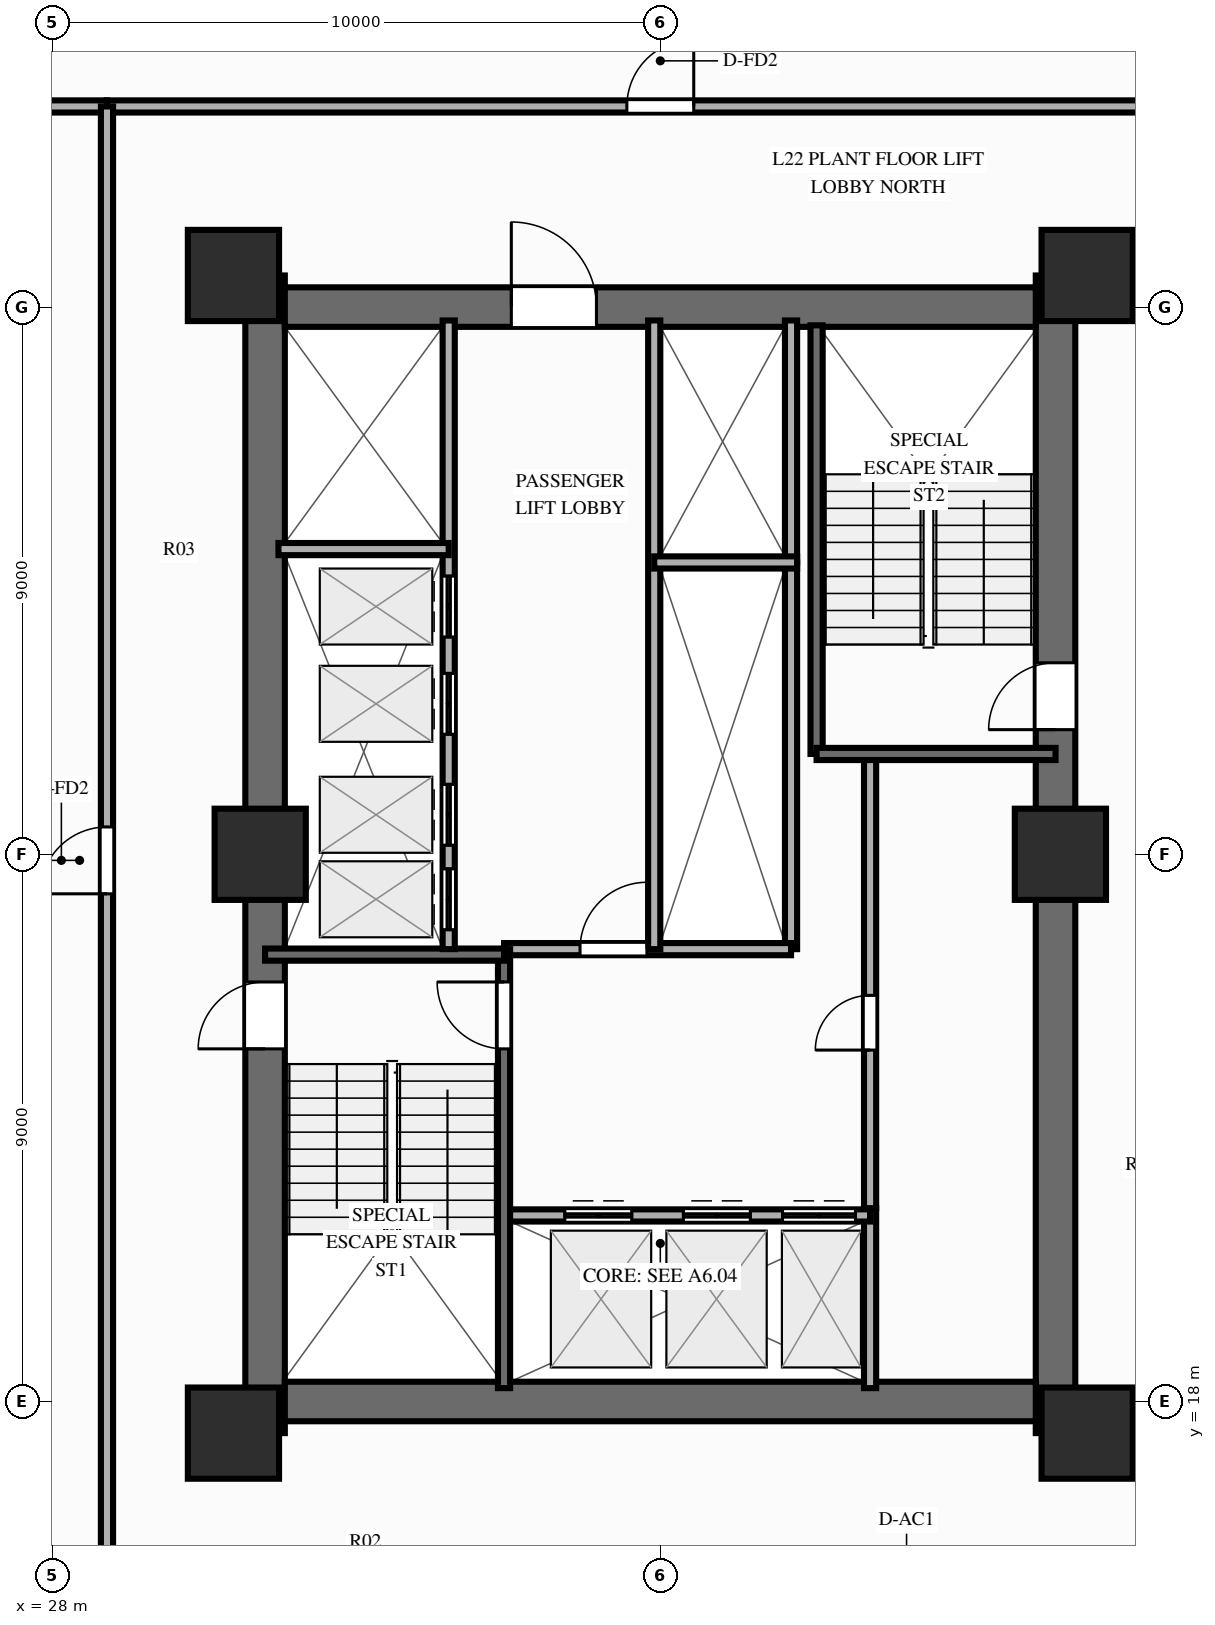
"""IFC4 building model, lengths in metres.
Left out: names, types, materials, properties, quantities, classifications, styles, units other than length and angle.
Written with IfcOpenShell. Run it as: python <this file> out.ifc"""

import sys

from ifc_helpers import new_model, si_unit, direction, frame, frame_2d, origin, origin_2d, place, context, subcontext, project, spatial, rectangle, extrude, source, transform, mapped, element, fill, save


model = new_model("IFC4")
c1 = context("Model", 3, precision=1e-05, world=origin(), true_north=direction((0.0, 1.0)))
c2 = subcontext(c1, "Body", "Model", "MODEL_VIEW")
j1 = project(units=[si_unit("LENGTHUNIT", "METRE"), si_unit("PLANEANGLEUNIT", "RADIAN")], contexts=[c1])
p1 = place(None, origin())
s1 = spatial("IfcSite", under=j1, at=p1, CompositionType="ELEMENT")
p2 = place(p1, origin())
s2 = spatial("IfcBuilding", under=s1, at=p2, CompositionType="ELEMENT")
p3 = place(p2, frame((0.0, 0.0, 70.4)))
s3 = spatial("IfcBuildingStorey", under=s2, at=p3, CompositionType="ELEMENT", Elevation=70.4)
p4 = place(p3, frame((31.5, 17.48, 0.0), z_axis=(0.0, 0.0, 1.0), x_axis=(0.0, 1.0, 0.0)))
e1 = element("IfcWall", 1, at=p4, inside=s3, PredefinedType="SHEAR", context=c2, shape_type="SweptSolid", body=[
    extrude(rectangle(XDim=19.04, YDim=0.65, at=frame_2d((9.52, 0.0))), origin(), (0.0, 0.0, 1.0), 3.95),
])
p5 = place(p4, frame((6.32, 0.0, 0.0)))
e2 = element("IfcOpeningElement", 2, at=p5, cuts=e1, PredefinedType="OPENING", context=c2, shape_type="SweptSolid", body=[
    extrude(rectangle(XDim=1.1, YDim=2.15, at=frame_2d((0.55, 1.075))), frame((0.0, 0.337, 0.0), z_axis=(0.0, -1.0, 0.0), x_axis=(1.0, 0.0, 0.0)), (0.0, 0.0, 1.0), 0.674),
])
p6 = place(p3, frame((44.5, 17.48, 0.0), z_axis=(0.0, 0.0, 1.0), x_axis=(0.0, 1.0, 0.0)))
e3 = element("IfcWall", 3, at=p6, inside=s3, PredefinedType="SHEAR", context=c2, shape_type="SweptSolid", body=[
    extrude(rectangle(XDim=19.04, YDim=0.65, at=frame_2d((9.52, 0.0))), origin(), (0.0, 0.0, 1.0), 3.95),
])
p7 = place(p6, frame((12.67, 0.0, 0.0), z_axis=(0.0, 0.0, 1.0), x_axis=(-1.0, 0.0, 0.0)))
e4 = element("IfcOpeningElement", 4, at=p7, cuts=e3, PredefinedType="OPENING", context=c2, shape_type="SweptSolid", body=[
    extrude(rectangle(XDim=1.1, YDim=2.15, at=frame_2d((0.55, 1.075))), frame((0.0, 0.337, 0.0), z_axis=(0.0, -1.0, 0.0), x_axis=(1.0, 0.0, 0.0)), (0.0, 0.0, 1.0), 0.674),
])
p8 = place(p3, frame((31.825, 18.0, 0.0), z_axis=(0.0, 0.0, 1.0), x_axis=(1.0, 0.0, 0.0)))
e5 = element("IfcWall", 5, at=p8, inside=s3, PredefinedType="SHEAR", context=c2, shape_type="SweptSolid", body=[
    extrude(rectangle(XDim=12.35, YDim=0.65, at=frame_2d((6.175, 0.0))), origin(), (0.0, 0.0, 1.0), 3.95),
])
p9 = place(p3, frame((31.825, 36.0, 0.0), z_axis=(0.0, 0.0, 1.0), x_axis=(1.0, 0.0, 0.0)))
e6 = element("IfcWall", 6, at=p9, inside=s3, PredefinedType="SHEAR", context=c2, shape_type="SweptSolid", body=[
    extrude(rectangle(XDim=12.35, YDim=0.65, at=frame_2d((6.175, 0.0))), origin(), (0.0, 0.0, 1.0), 3.95),
])
p10 = place(p9, frame((5.125, 0.0, 0.0), z_axis=(0.0, 0.0, 1.0), x_axis=(-1.0, 0.0, 0.0)))
e7 = element("IfcOpeningElement", 7, at=p10, cuts=e6, PredefinedType="OPENING", context=c2, shape_type="SweptSolid", body=[
    extrude(rectangle(XDim=1.4, YDim=2.15, at=frame_2d((0.7, 1.075))), frame((0.0, 0.337, 0.0), z_axis=(0.0, -1.0, 0.0), x_axis=(1.0, 0.0, 0.0)), (0.0, 0.0, 1.0), 0.674),
])
m1 = source(origin(), c2, "Body", "SweptSolid", [
    extrude(rectangle(XDim=1.5, YDim=1.5, at=origin_2d()), origin(), (0.0, 0.0, 1.0), 3.95),
])
for number, where, z_axis, x_axis in (
    (8, (30.98, 17.48, 0.0), (0.0, 0.0, 1.0), (1.0, 0.0, 0.0)),
    (9, (45.02, 17.48, 0.0), (0.0, 0.0, 1.0), (1.0, 0.0, 0.0)),
    (10, (30.98, 36.52, 0.0), (0.0, 0.0, 1.0), (1.0, 0.0, 0.0)),
    (11, (45.02, 36.52, 0.0), (0.0, 0.0, 1.0), (1.0, 0.0, 0.0)),
    (12, (31.42, 27.0, 0.0), (0.0, 0.0, 1.0), (1.0, 0.0, 0.0)),
    (13, (44.58, 27.0, 0.0), (0.0, 0.0, 1.0), (1.0, 0.0, 0.0)),
):
    element("IfcColumn", number, at=place(p3, frame(where, z_axis=z_axis, x_axis=x_axis)), inside=s3, PredefinedType="COLUMN", context=c2, shape_type="MappedRepresentation", body=[
        mapped(m1, transform((0.0, 0.0, 0.0), scale=1.0)),
    ])
p11 = place(p3, frame((41.45, 18.22, 0.0), z_axis=(0.0, 0.0, 1.0), x_axis=(0.0, 1.0, 0.0)))
e14 = element("IfcWall", 14, at=p11, inside=s3, PredefinedType="PARTITIONING", context=c2, shape_type="SweptSolid", body=[
    extrude(rectangle(XDim=2.96, YDim=0.2, at=frame_2d((1.48, 0.0))), origin(), (0.0, 0.0, 1.0), 3.61),
])
p12 = place(p3, frame((41.45, 21.18, 0.0), z_axis=(0.0, 0.0, 1.0), x_axis=(0.0, 1.0, 0.0)))
e15 = element("IfcWall", 15, at=p12, inside=s3, PredefinedType="PARTITIONING", context=c2, shape_type="SweptSolid", body=[
    extrude(rectangle(XDim=7.42, YDim=0.2, at=frame_2d((3.71, 0.0))), origin(), (0.0, 0.0, 1.0), 3.61),
])
p13 = place(p12, frame((2.6, 0.0, 0.0)))
e16 = element("IfcOpeningElement", 16, at=p13, cuts=e15, PredefinedType="OPENING", context=c2, shape_type="SweptSolid", body=[
    extrude(rectangle(XDim=0.9, YDim=2.1, at=frame_2d((0.45, 1.05))), frame((0.0, 0.112, 0.0), z_axis=(0.0, -1.0, 0.0), x_axis=(1.0, 0.0, 0.0)), (0.0, 0.0, 1.0), 0.224),
])
p14 = place(p3, frame((40.15, 25.44, 0.0), z_axis=(0.0, 0.0, 1.0), x_axis=(0.0, 1.0, 0.0)))
e17 = element("IfcWall", 17, at=p14, inside=s3, PredefinedType="PARTITIONING", context=c2, shape_type="SweptSolid", body=[
    extrude(rectangle(XDim=6.36, YDim=0.2, at=frame_2d((3.18, 0.0))), origin(), (0.0, 0.0, 1.0), 3.61),
])
p15 = place(p3, frame((40.15, 31.8, 0.0), z_axis=(0.0, 0.0, 1.0), x_axis=(0.0, 1.0, 0.0)))
e18 = element("IfcWall", 18, at=p15, inside=s3, PredefinedType="PARTITIONING", context=c2, shape_type="SweptSolid", body=[
    extrude(rectangle(XDim=3.98, YDim=0.2, at=frame_2d((1.99, 0.0))), origin(), (0.0, 0.0, 1.0), 3.61),
])
p16 = place(p3, frame((35.43, 21.06, 0.0), z_axis=(0.0, 0.0, 1.0), x_axis=(1.0, 0.0, 0.0)))
e19 = element("IfcWall", 19, at=p16, inside=s3, PredefinedType="PARTITIONING", context=c2, shape_type="SweptSolid", body=[
    extrude(rectangle(XDim=6.02, YDim=0.2, at=frame_2d((3.01, 0.0))), origin(), (0.0, 0.0, 1.0), 3.61),
])
p17 = place(p16, frame((1.0, 0.0, 0.0)))
e20 = element("IfcOpeningElement", 20, at=p17, cuts=e19, PredefinedType="OPENING", context=c2, shape_type="SweptSolid", body=[
    extrude(rectangle(XDim=1.1, YDim=2.15, at=frame_2d((0.55, 1.075))), frame((0.0, 0.112, 0.0), z_axis=(0.0, -1.0, 0.0), x_axis=(1.0, 0.0, 0.0)), (0.0, 0.0, 1.0), 0.224),
])
p18 = place(p16, frame((2.95, 0.0, 0.0)))
e21 = element("IfcOpeningElement", 21, at=p18, cuts=e19, PredefinedType="OPENING", context=c2, shape_type="SweptSolid", body=[
    extrude(rectangle(XDim=1.1, YDim=2.15, at=frame_2d((0.55, 1.075))), frame((0.0, 0.112, 0.0), z_axis=(0.0, -1.0, 0.0), x_axis=(1.0, 0.0, 0.0)), (0.0, 0.0, 1.0), 0.224),
])
p19 = place(p16, frame((4.58, 0.0, 0.0)))
e22 = element("IfcOpeningElement", 22, at=p19, cuts=e19, PredefinedType="OPENING", context=c2, shape_type="SweptSolid", body=[
    extrude(rectangle(XDim=1.2, YDim=2.15, at=frame_2d((0.6, 1.075))), frame((0.0, 0.112, 0.0), z_axis=(0.0, -1.0, 0.0), x_axis=(1.0, 0.0, 0.0)), (0.0, 0.0, 1.0), 0.224),
])
p20 = place(p3, frame((35.43, 25.44, 0.0), z_axis=(0.0, 0.0, 1.0), x_axis=(1.0, 0.0, 0.0)))
e23 = element("IfcWall", 23, at=p20, inside=s3, PredefinedType="PARTITIONING", context=c2, shape_type="SweptSolid", body=[
    extrude(rectangle(XDim=4.72, YDim=0.2, at=frame_2d((2.36, 0.0))), origin(), (0.0, 0.0, 1.0), 3.61),
])
p21 = place(p20, frame((1.25, 0.0, 0.0)))
e24 = element("IfcOpeningElement", 24, at=p21, cuts=e23, PredefinedType="OPENING", context=c2, shape_type="SweptSolid", body=[
    extrude(rectangle(XDim=1.1, YDim=2.15, at=frame_2d((0.55, 1.075))), frame((0.0, 0.112, 0.0), z_axis=(0.0, -1.0, 0.0), x_axis=(1.0, 0.0, 0.0)), (0.0, 0.0, 1.0), 0.224),
])
p22 = place(p3, frame((35.43, 18.22, 0.0), z_axis=(0.0, 0.0, 1.0), x_axis=(0.0, 1.0, 0.0)))
e25 = element("IfcWall", 25, at=p22, inside=s3, PredefinedType="SOLIDWALL", context=c2, shape_type="SweptSolid", body=[
    extrude(rectangle(XDim=7.22, YDim=0.2, at=frame_2d((3.61, 0.0))), origin(), (0.0, 0.0, 1.0), 3.69),
])
p23 = place(p22, frame((6.68, 0.0, 0.0), z_axis=(0.0, 0.0, 1.0), x_axis=(-1.0, 0.0, 0.0)))
e26 = element("IfcOpeningElement", 26, at=p23, cuts=e25, PredefinedType="OPENING", context=c2, shape_type="SweptSolid", body=[
    extrude(rectangle(XDim=1.1, YDim=2.15, at=frame_2d((0.55, 1.075))), frame((0.0, 0.112, 0.0), z_axis=(0.0, -1.0, 0.0), x_axis=(1.0, 0.0, 0.0)), (0.0, 0.0, 1.0), 0.224),
])
p24 = place(p3, frame((31.5, 25.35, 0.0), z_axis=(0.0, 0.0, 1.0), x_axis=(1.0, 0.0, 0.0)))
e27 = element("IfcWall", 27, at=p24, inside=s3, PredefinedType="SOLIDWALL", context=c2, shape_type="SweptSolid", body=[
    extrude(rectangle(XDim=3.93, YDim=0.2, at=frame_2d((1.965, 0.0))), origin(), (0.0, 0.0, 1.0), 3.69),
])
p25 = place(p3, frame((40.57, 28.65, 0.0), z_axis=(0.0, 0.0, 1.0), x_axis=(0.0, 1.0, 0.0)))
e28 = element("IfcWall", 28, at=p25, inside=s3, PredefinedType="SOLIDWALL", context=c2, shape_type="SweptSolid", body=[
    extrude(rectangle(XDim=7.05, YDim=0.2, at=frame_2d((3.525, 0.0))), origin(), (0.0, 0.0, 1.0), 3.69),
])
p26 = place(p3, frame((40.57, 28.65, 0.0), z_axis=(0.0, 0.0, 1.0), x_axis=(1.0, 0.0, 0.0)))
e29 = element("IfcWall", 29, at=p26, inside=s3, PredefinedType="SOLIDWALL", context=c2, shape_type="SweptSolid", body=[
    extrude(rectangle(XDim=3.93, YDim=0.2, at=frame_2d((1.965, 0.0))), origin(), (0.0, 0.0, 1.0), 3.69),
])
p27 = place(p3, frame((34.52, 25.44, 0.0), z_axis=(0.0, 0.0, 1.0), x_axis=(0.0, 1.0, 0.0)))
e30 = element("IfcWall", 30, at=p27, inside=s3, PredefinedType="PARTITIONING", context=c2, shape_type="SweptSolid", body=[
    extrude(rectangle(XDim=10.34, YDim=0.2, at=frame_2d((5.17, 0.0))), origin(), (0.0, 0.0, 1.0), 3.61),
])
p28 = place(p27, frame((0.32, 0.0, 0.0)))
e31 = element("IfcOpeningElement", 31, at=p28, cuts=e30, PredefinedType="OPENING", context=c2, shape_type="SweptSolid", body=[
    extrude(rectangle(XDim=1.0, YDim=2.15, at=frame_2d((0.5, 1.075))), frame((0.0, 0.112, 0.0), z_axis=(0.0, -1.0, 0.0), x_axis=(1.0, 0.0, 0.0)), (0.0, 0.0, 1.0), 0.224),
])
p29 = place(p27, frame((1.71, 0.0, 0.0)))
e32 = element("IfcOpeningElement", 32, at=p29, cuts=e30, PredefinedType="OPENING", context=c2, shape_type="SweptSolid", body=[
    extrude(rectangle(XDim=1.0, YDim=2.15, at=frame_2d((0.5, 1.075))), frame((0.0, 0.112, 0.0), z_axis=(0.0, -1.0, 0.0), x_axis=(1.0, 0.0, 0.0)), (0.0, 0.0, 1.0), 0.224),
])
p30 = place(p27, frame((3.535, 0.0, 0.0)))
e33 = element("IfcOpeningElement", 33, at=p30, cuts=e30, PredefinedType="OPENING", context=c2, shape_type="SweptSolid", body=[
    extrude(rectangle(XDim=1.0, YDim=2.15, at=frame_2d((0.5, 1.075))), frame((0.0, 0.112, 0.0), z_axis=(0.0, -1.0, 0.0), x_axis=(1.0, 0.0, 0.0)), (0.0, 0.0, 1.0), 0.224),
])
p31 = place(p27, frame((5.135, 0.0, 0.0)))
e34 = element("IfcOpeningElement", 34, at=p31, cuts=e30, PredefinedType="OPENING", context=c2, shape_type="SweptSolid", body=[
    extrude(rectangle(XDim=1.0, YDim=2.15, at=frame_2d((0.5, 1.075))), frame((0.0, 0.112, 0.0), z_axis=(0.0, -1.0, 0.0), x_axis=(1.0, 0.0, 0.0)), (0.0, 0.0, 1.0), 0.224),
])
p32 = place(p3, frame((31.72, 32.02, 0.0), z_axis=(0.0, 0.0, 1.0), x_axis=(1.0, 0.0, 0.0)))
e35 = element("IfcWall", 35, at=p32, inside=s3, PredefinedType="PARTITIONING", context=c2, shape_type="SweptSolid", body=[
    extrude(rectangle(XDim=2.8, YDim=0.2, at=frame_2d((1.4, 0.0))), origin(), (0.0, 0.0, 1.0), 3.61),
])
p33 = place(p3, frame((37.9, 25.44, 0.0), z_axis=(0.0, 0.0, 1.0), x_axis=(0.0, 1.0, 0.0)))
e36 = element("IfcWall", 36, at=p33, inside=s3, PredefinedType="PARTITIONING", context=c2, shape_type="SweptSolid", body=[
    extrude(rectangle(XDim=10.34, YDim=0.2, at=frame_2d((5.17, 0.0))), origin(), (0.0, 0.0, 1.0), 3.61),
])
p34 = place(p3, frame((37.9, 31.8, 0.0), z_axis=(0.0, 0.0, 1.0), x_axis=(1.0, 0.0, 0.0)))
e37 = element("IfcWall", 37, at=p34, inside=s3, PredefinedType="PARTITIONING", context=c2, shape_type="SweptSolid", body=[
    extrude(rectangle(XDim=2.35, YDim=0.2, at=frame_2d((1.175, 0.0))), origin(), (0.0, 0.0, 1.0), 3.61),
])
p35 = place(p3, frame((15.5, 39.3, 0.0), z_axis=(0.0, 0.0, 1.0), x_axis=(1.0, 0.0, 0.0)))
e38 = element("IfcWall", 38, at=p35, inside=s3, PredefinedType="PARTITIONING", context=c2, shape_type="SweptSolid", body=[
    extrude(rectangle(XDim=13.4, YDim=0.2, at=frame_2d((6.7, 0.0))), origin(), (0.0, 0.0, 1.0), 3.61),
])
p36 = place(p3, frame((28.9, 39.3, 0.0), z_axis=(0.0, 0.0, 1.0), x_axis=(1.0, 0.0, 0.0)))
e39 = element("IfcWall", 39, at=p36, inside=s3, PredefinedType="PARTITIONING", context=c2, shape_type="SweptSolid", body=[
    extrude(rectangle(XDim=18.2, YDim=0.2, at=frame_2d((9.1, 0.0))), origin(), (0.0, 0.0, 1.0), 3.61),
])
p37 = place(p36, frame((8.55, 0.0, 0.0)))
e40 = element("IfcOpeningElement", 40, at=p37, cuts=e39, PredefinedType="OPENING", context=c2, shape_type="SweptSolid", body=[
    extrude(rectangle(XDim=1.1, YDim=2.15, at=frame_2d((0.55, 1.075))), frame((0.0, 0.112, 0.0), z_axis=(0.0, -1.0, 0.0), x_axis=(1.0, 0.0, 0.0)), (0.0, 0.0, 1.0), 0.224),
])
p38 = place(p3, frame((28.9, 14.5, 0.0), z_axis=(0.0, 0.0, 1.0), x_axis=(0.0, 1.0, 0.0)))
e41 = element("IfcWall", 41, at=p38, inside=s3, PredefinedType="PARTITIONING", context=c2, shape_type="SweptSolid", body=[
    extrude(rectangle(XDim=24.8, YDim=0.2, at=frame_2d((12.4, 0.0))), origin(), (0.0, 0.0, 1.0), 3.61),
])
p39 = place(p38, frame((11.85, 0.0, 0.0)))
e42 = element("IfcOpeningElement", 42, at=p39, cuts=e41, PredefinedType="OPENING", context=c2, shape_type="SweptSolid", body=[
    extrude(rectangle(XDim=1.1, YDim=2.15, at=frame_2d((0.55, 1.075))), frame((0.0, 0.112, 0.0), z_axis=(0.0, -1.0, 0.0), x_axis=(1.0, 0.0, 0.0)), (0.0, 0.0, 1.0), 0.224),
])
m2 = source(origin(), c2, "Body", "SweptSolid", [
    extrude(rectangle(XDim=1.1, YDim=2.15, at=frame_2d((0.55, 1.075))), frame((0.0, 0.025, 0.0), z_axis=(0.0, -1.0, 0.0), x_axis=(1.0, 0.0, 0.0)), (0.0, 0.0, 1.0), 0.05),
])
p40 = place(p5, origin())
e43 = element("IfcDoor", 43, at=p40, inside=s3, OperationType="SINGLE_SWING_LEFT", PredefinedType="DOOR", context=c2, shape_type="MappedRepresentation", body=[
    mapped(m2, transform((0.0, 0.0, 0.0), scale=1.0)),
])
fill(e2, e43)
p41 = place(p7, origin())
e44 = element("IfcDoor", 44, at=p41, inside=s3, OperationType="SINGLE_SWING_RIGHT", PredefinedType="DOOR", context=c2, shape_type="MappedRepresentation", body=[
    mapped(m2, transform((0.0, 0.0, 0.0), scale=1.0)),
])
fill(e4, e44)
m3 = source(origin(), c2, "Body", "SweptSolid", [
    extrude(rectangle(XDim=1.4, YDim=2.15, at=frame_2d((0.7, 1.075))), frame((0.0, 0.025, 0.0), z_axis=(0.0, -1.0, 0.0), x_axis=(1.0, 0.0, 0.0)), (0.0, 0.0, 1.0), 0.05),
])
p42 = place(p10, origin())
e45 = element("IfcDoor", 45, at=p42, inside=s3, OperationType="SINGLE_SWING_RIGHT", PredefinedType="DOOR", context=c2, shape_type="MappedRepresentation", body=[
    mapped(m3, transform((0.0, 0.0, 0.0), scale=1.0)),
])
fill(e7, e45)
m4 = source(origin(), c2, "Body", "SweptSolid", [
    extrude(rectangle(XDim=0.9, YDim=2.1, at=frame_2d((0.45, 1.05))), frame((0.0, 0.025, 0.0), z_axis=(0.0, -1.0, 0.0), x_axis=(1.0, 0.0, 0.0)), (0.0, 0.0, 1.0), 0.05),
])
p43 = place(p13, origin())
e46 = element("IfcDoor", 46, at=p43, inside=s3, OperationType="SINGLE_SWING_LEFT", PredefinedType="DOOR", context=c2, shape_type="MappedRepresentation", body=[
    mapped(m4, transform((0.0, 0.0, 0.0), scale=1.0)),
])
fill(e16, e46)
p44 = place(p17, origin())
e47 = element("IfcDoor", 47, at=p44, inside=s3, OperationType="DOUBLE_DOOR_SLIDING", PredefinedType="DOOR", context=c2, shape_type="MappedRepresentation", body=[
    mapped(m2, transform((0.0, 0.0, 0.0), scale=1.0)),
])
fill(e20, e47)
p45 = place(p18, origin())
e48 = element("IfcDoor", 48, at=p45, inside=s3, OperationType="DOUBLE_DOOR_SLIDING", PredefinedType="DOOR", context=c2, shape_type="MappedRepresentation", body=[
    mapped(m2, transform((0.0, 0.0, 0.0), scale=1.0)),
])
fill(e21, e48)
m5 = source(origin(), c2, "Body", "SweptSolid", [
    extrude(rectangle(XDim=1.2, YDim=2.15, at=frame_2d((0.6, 1.075))), frame((0.0, 0.025, 0.0), z_axis=(0.0, -1.0, 0.0), x_axis=(1.0, 0.0, 0.0)), (0.0, 0.0, 1.0), 0.05),
])
p46 = place(p19, origin())
e49 = element("IfcDoor", 49, at=p46, inside=s3, OperationType="DOUBLE_DOOR_SLIDING", PredefinedType="DOOR", context=c2, shape_type="MappedRepresentation", body=[
    mapped(m5, transform((0.0, 0.0, 0.0), scale=1.0)),
])
fill(e22, e49)
p47 = place(p21, origin())
e50 = element("IfcDoor", 50, at=p47, inside=s3, OperationType="SINGLE_SWING_RIGHT", PredefinedType="DOOR", context=c2, shape_type="MappedRepresentation", body=[
    mapped(m2, transform((0.0, 0.0, 0.0), scale=1.0)),
])
fill(e24, e50)
p48 = place(p23, origin())
e51 = element("IfcDoor", 51, at=p48, inside=s3, OperationType="SINGLE_SWING_LEFT", PredefinedType="DOOR", context=c2, shape_type="MappedRepresentation", body=[
    mapped(m2, transform((0.0, 0.0, 0.0), scale=1.0)),
])
fill(e26, e51)
m6 = source(origin(), c2, "Body", "SweptSolid", [
    extrude(rectangle(XDim=1.0, YDim=2.15, at=frame_2d((0.5, 1.075))), frame((0.0, 0.025, 0.0), z_axis=(0.0, -1.0, 0.0), x_axis=(1.0, 0.0, 0.0)), (0.0, 0.0, 1.0), 0.05),
])
p49 = place(p28, origin())
e52 = element("IfcDoor", 52, at=p49, inside=s3, OperationType="DOUBLE_DOOR_SLIDING", PredefinedType="DOOR", context=c2, shape_type="MappedRepresentation", body=[
    mapped(m6, transform((0.0, 0.0, 0.0), scale=1.0)),
])
fill(e31, e52)
p50 = place(p29, origin())
e53 = element("IfcDoor", 53, at=p50, inside=s3, OperationType="DOUBLE_DOOR_SLIDING", PredefinedType="DOOR", context=c2, shape_type="MappedRepresentation", body=[
    mapped(m6, transform((0.0, 0.0, 0.0), scale=1.0)),
])
fill(e32, e53)
p51 = place(p30, origin())
e54 = element("IfcDoor", 54, at=p51, inside=s3, OperationType="DOUBLE_DOOR_SLIDING", PredefinedType="DOOR", context=c2, shape_type="MappedRepresentation", body=[
    mapped(m6, transform((0.0, 0.0, 0.0), scale=1.0)),
])
fill(e33, e54)
p52 = place(p31, origin())
e55 = element("IfcDoor", 55, at=p52, inside=s3, OperationType="DOUBLE_DOOR_SLIDING", PredefinedType="DOOR", context=c2, shape_type="MappedRepresentation", body=[
    mapped(m6, transform((0.0, 0.0, 0.0), scale=1.0)),
])
fill(e34, e55)
p53 = place(p37, origin())
e56 = element("IfcDoor", 56, at=p53, inside=s3, OperationType="SINGLE_SWING_RIGHT", PredefinedType="DOOR", context=c2, shape_type="MappedRepresentation", body=[
    mapped(m2, transform((0.0, 0.0, 0.0), scale=1.0)),
])
fill(e40, e56)
p54 = place(p39, origin())
e57 = element("IfcDoor", 57, at=p54, inside=s3, OperationType="SINGLE_SWING_LEFT", PredefinedType="DOOR", context=c2, shape_type="MappedRepresentation", body=[
    mapped(m2, transform((0.0, 0.0, 0.0), scale=1.0)),
])
fill(e42, e57)
save(model, sys.argv[1])
